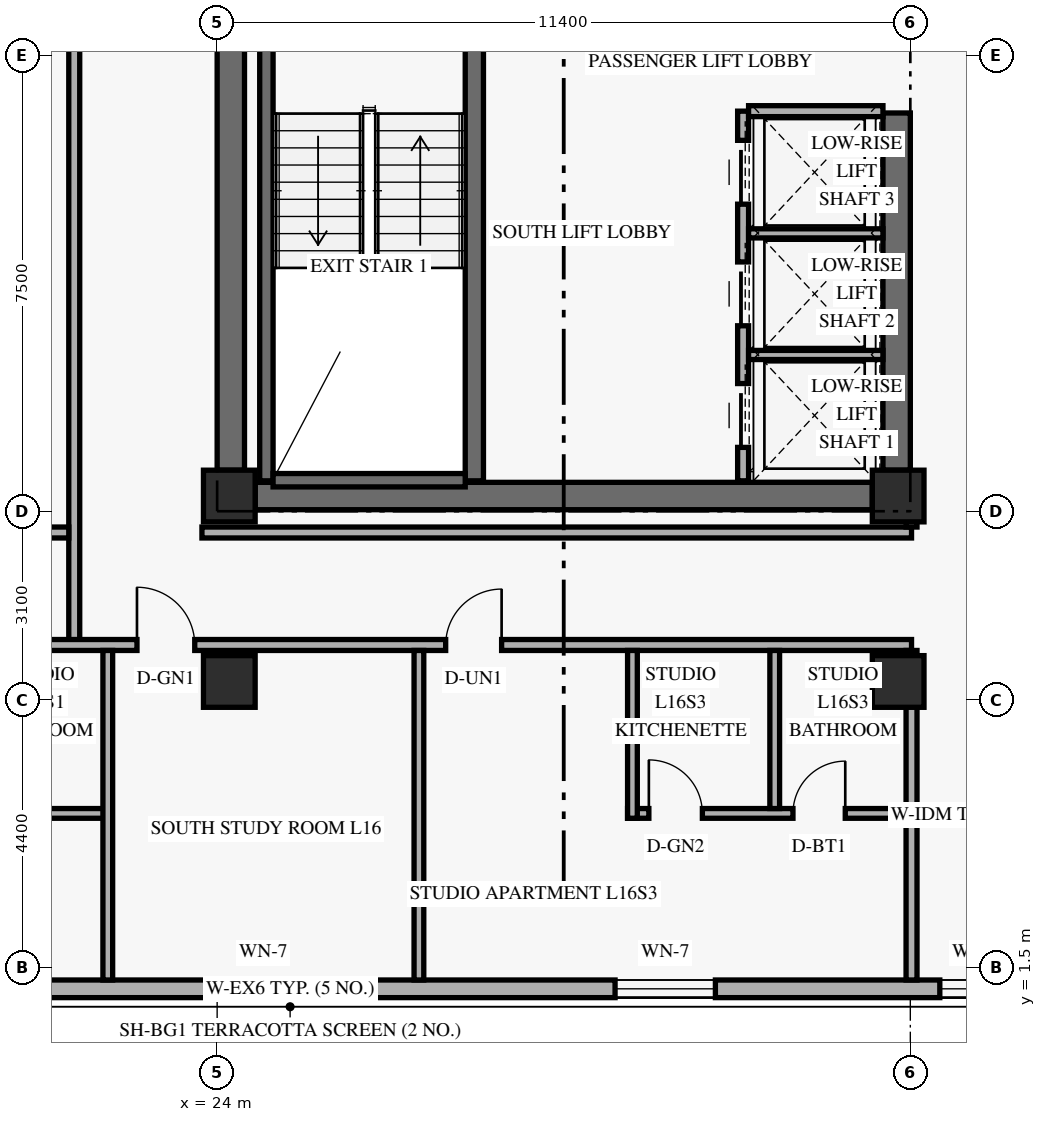
"""IFC4 building model, lengths in metres.
Left out: names, types, materials, properties, quantities, classifications, styles, units other than length and angle.
Written with IfcOpenShell. Run it as: python <this file> out.ifc"""

import sys

from ifc_helpers import new_model, si_unit, direction, frame, frame_2d, origin, origin_2d, place, context, subcontext, project, spatial, rectangle, extrude, element, fill, save


model = new_model("IFC4")
c1 = context("Model", 3, precision=1e-05, world=origin(), true_north=direction((0.0, 1.0)))
c2 = subcontext(c1, "Body", "Model", "MODEL_VIEW")
j1 = project(units=[si_unit("LENGTHUNIT", "METRE"), si_unit("PLANEANGLEUNIT", "RADIAN")], contexts=[c1])
p1 = place(None, origin())
s1 = spatial("IfcSite", under=j1, at=p1, CompositionType="ELEMENT")
p2 = place(p1, origin())
s2 = spatial("IfcBuilding", under=s1, at=p2, CompositionType="ELEMENT")
p3 = place(p2, frame((0.0, 0.0, 64.2)))
s3 = spatial("IfcBuildingStorey", under=s2, at=p3, CompositionType="ELEMENT", Elevation=64.2)
p4 = place(p3, frame((24.225, 9.675, 0.0), z_axis=(0.0, 0.0, 1.0), x_axis=(0.0, 1.0, 0.0)))
e1 = element("IfcWall", 1, at=p4, inside=s3, PredefinedType="SHEAR", context=c2, shape_type="SweptSolid", body=[
    extrude(rectangle(XDim=7.45, YDim=0.45, at=frame_2d((3.725, 0.0))), origin(), (0.0, 0.0, 1.0), 2.667),
])
p5 = place(p3, frame((35.175, 9.675, 0.0), z_axis=(0.0, 0.0, 1.0), x_axis=(0.0, 1.0, 0.0)))
e2 = element("IfcWall", 2, at=p5, inside=s3, PredefinedType="SHEAR", context=c2, shape_type="SweptSolid", body=[
    extrude(rectangle(XDim=5.875, YDim=0.45, at=frame_2d((2.938, 0.0))), origin(), (0.0, 0.0, 1.0), 2.667),
])
p6 = place(p3, frame((24.625, 9.25, 0.0), z_axis=(0.0, 0.0, 1.0), x_axis=(1.0, 0.0, 0.0)))
e3 = element("IfcWall", 3, at=p6, inside=s3, PredefinedType="SHEAR", context=c2, shape_type="SweptSolid", body=[
    extrude(rectangle(XDim=10.15, YDim=0.45, at=frame_2d((5.075, 0.0))), origin(), (0.0, 0.0, 1.0), 3.36),
])
p7 = place(p3, frame((24.81, 9.5, 0.0), z_axis=(0.0, 0.0, 1.0), x_axis=(0.0, 1.0, 0.0)))
e4 = element("IfcWall", 4, at=p7, inside=s3, PredefinedType="SHEAR", context=c2, shape_type="SweptSolid", body=[
    extrude(rectangle(XDim=7.76, YDim=0.22, at=frame_2d((3.88, 0.0))), origin(), (0.0, 0.0, 1.0), 3.36),
])
p8 = place(p3, frame((28.23, 9.5, 0.0), z_axis=(0.0, 0.0, 1.0), x_axis=(0.0, 1.0, 0.0)))
e5 = element("IfcWall", 5, at=p8, inside=s3, PredefinedType="SHEAR", context=c2, shape_type="SweptSolid", body=[
    extrude(rectangle(XDim=7.76, YDim=0.3, at=frame_2d((3.88, 0.0))), origin(), (0.0, 0.0, 1.0), 3.36),
])
p9 = place(p3, frame((24.92, 9.51, 0.0), z_axis=(0.0, 0.0, 1.0), x_axis=(1.0, 0.0, 0.0)))
e6 = element("IfcWall", 6, at=p9, inside=s3, PredefinedType="SHEAR", context=c2, shape_type="SweptSolid", body=[
    extrude(rectangle(XDim=3.16, YDim=0.22, at=frame_2d((1.58, 0.0))), origin(), (0.0, 0.0, 1.0), 3.36),
])
for number, where, z_axis, x_axis in (
    (7, (24.2, 6.2, 0.0), (0.0, 0.0, 1.0), (1.0, 0.0, 0.0)),
    (8, (24.2, 9.25, 0.0), (0.0, 0.0, 1.0), (1.0, 0.0, 0.0)),
    (9, (35.2, 6.2, 0.0), (0.0, 0.0, 1.0), (1.0, 0.0, 0.0)),
    (10, (35.2, 9.25, 0.0), (0.0, 0.0, 1.0), (1.0, 0.0, 0.0)),
):
    element("IfcColumn", number, at=place(p3, frame(where, z_axis=z_axis, x_axis=x_axis)), inside=s3, PredefinedType="COLUMN", context=c2, shape_type="SweptSolid", body=[
        extrude(rectangle(XDim=0.85, YDim=0.85, at=origin_2d()), origin(), (0.0, 0.0, 1.0), 3.6),
    ])
p10 = place(p3, frame((5.42, 1.145, 0.0), z_axis=(0.0, 0.0, 1.0), x_axis=(1.0, 0.0, 0.0)))
e11 = element("IfcWall", 11, at=p10, inside=s3, PredefinedType="SOLIDWALL", context=c2, shape_type="SweptSolid", body=[
    extrude(rectangle(XDim=39.56, YDim=0.29, at=frame_2d((19.78, 0.0))), origin(), (0.0, 0.0, 1.0), 3.36),
])
p11 = place(p10, frame((2.615, 0.0, 0.85)))
e12 = element("IfcOpeningElement", 12, at=p11, cuts=e11, PredefinedType="OPENING", context=c2, shape_type="SweptSolid", body=[
    extrude(rectangle(XDim=1.65, YDim=1.6, at=frame_2d((0.825, 0.8))), frame((0.0, 0.155, 0.0), z_axis=(0.0, -1.0, 0.0), x_axis=(1.0, 0.0, 0.0)), (0.0, 0.0, 1.0), 0.31),
])
p12 = place(p10, frame((7.18, 0.0, 0.85)))
e13 = element("IfcOpeningElement", 13, at=p12, cuts=e11, PredefinedType="OPENING", context=c2, shape_type="SweptSolid", body=[
    extrude(rectangle(XDim=1.2, YDim=1.5, at=frame_2d((0.6, 0.75))), frame((0.0, 0.155, 0.0), z_axis=(0.0, -1.0, 0.0), x_axis=(1.0, 0.0, 0.0)), (0.0, 0.0, 1.0), 0.31),
])
p13 = place(p10, frame((11.906, 0.0, 0.85)))
e14 = element("IfcOpeningElement", 14, at=p13, cuts=e11, PredefinedType="OPENING", context=c2, shape_type="SweptSolid", body=[
    extrude(rectangle(XDim=1.65, YDim=1.6, at=frame_2d((0.825, 0.8))), frame((0.0, 0.155, 0.0), z_axis=(0.0, -1.0, 0.0), x_axis=(1.0, 0.0, 0.0)), (0.0, 0.0, 1.0), 0.31),
])
p14 = place(p10, frame((18.515, 0.0, 0.85)))
e15 = element("IfcOpeningElement", 15, at=p14, cuts=e11, PredefinedType="OPENING", context=c2, shape_type="SweptSolid", body=[
    extrude(rectangle(XDim=1.65, YDim=1.6, at=frame_2d((0.825, 0.8))), frame((0.0, 0.155, 0.0), z_axis=(0.0, -1.0, 0.0), x_axis=(1.0, 0.0, 0.0)), (0.0, 0.0, 1.0), 0.31),
])
p15 = place(p10, frame((25.124, 0.0, 0.85)))
e16 = element("IfcOpeningElement", 16, at=p15, cuts=e11, PredefinedType="OPENING", context=c2, shape_type="SweptSolid", body=[
    extrude(rectangle(XDim=1.65, YDim=1.6, at=frame_2d((0.825, 0.8))), frame((0.0, 0.155, 0.0), z_axis=(0.0, -1.0, 0.0), x_axis=(1.0, 0.0, 0.0)), (0.0, 0.0, 1.0), 0.31),
])
p16 = place(p10, frame((30.465, 0.0, 0.85)))
e17 = element("IfcOpeningElement", 17, at=p16, cuts=e11, PredefinedType="OPENING", context=c2, shape_type="SweptSolid", body=[
    extrude(rectangle(XDim=1.2, YDim=1.5, at=frame_2d((0.6, 0.75))), frame((0.0, 0.155, 0.0), z_axis=(0.0, -1.0, 0.0), x_axis=(1.0, 0.0, 0.0)), (0.0, 0.0, 1.0), 0.31),
])
p17 = place(p10, frame((35.02, 0.0, 0.85)))
e18 = element("IfcOpeningElement", 18, at=p17, cuts=e11, PredefinedType="OPENING", context=c2, shape_type="SweptSolid", body=[
    extrude(rectangle(XDim=1.65, YDim=1.6, at=frame_2d((0.825, 0.8))), frame((0.0, 0.155, 0.0), z_axis=(0.0, -1.0, 0.0), x_axis=(1.0, 0.0, 0.0)), (0.0, 0.0, 1.0), 0.31),
])
p18 = place(p3, frame((32.65, 9.5, 0.0), z_axis=(0.0, 0.0, 1.0), x_axis=(0.0, 1.0, 0.0)))
e19 = element("IfcWall", 19, at=p18, inside=s3, PredefinedType="STANDARD", context=c2, shape_type="SweptSolid", body=[
    extrude(rectangle(XDim=6.08, YDim=0.18, at=frame_2d((3.04, 0.0))), origin(), (0.0, 0.0, 1.0), 3.36),
])
p19 = place(p18, frame((0.55, 0.0, 0.0)))
e20 = element("IfcOpeningElement", 20, at=p19, cuts=e19, PredefinedType="OPENING", context=c2, shape_type="SweptSolid", body=[
    extrude(rectangle(XDim=1.05, YDim=2.2, at=frame_2d((0.525, 1.1))), frame((0.0, 0.1, 0.0), z_axis=(0.0, -1.0, 0.0), x_axis=(1.0, 0.0, 0.0)), (0.0, 0.0, 1.0), 0.2),
])
p20 = place(p18, frame((2.55, 0.0, 0.0)))
e21 = element("IfcOpeningElement", 21, at=p20, cuts=e19, PredefinedType="OPENING", context=c2, shape_type="SweptSolid", body=[
    extrude(rectangle(XDim=1.05, YDim=2.2, at=frame_2d((0.525, 1.1))), frame((0.0, 0.1, 0.0), z_axis=(0.0, -1.0, 0.0), x_axis=(1.0, 0.0, 0.0)), (0.0, 0.0, 1.0), 0.2),
])
p21 = place(p18, frame((4.55, 0.0, 0.0)))
e22 = element("IfcOpeningElement", 22, at=p21, cuts=e19, PredefinedType="OPENING", context=c2, shape_type="SweptSolid", body=[
    extrude(rectangle(XDim=1.05, YDim=2.2, at=frame_2d((0.525, 1.1))), frame((0.0, 0.1, 0.0), z_axis=(0.0, -1.0, 0.0), x_axis=(1.0, 0.0, 0.0)), (0.0, 0.0, 1.0), 0.2),
])
p22 = place(p3, frame((32.74, 15.58, 0.0), z_axis=(0.0, 0.0, 1.0), x_axis=(1.0, 0.0, 0.0)))
e23 = element("IfcWall", 23, at=p22, inside=s3, PredefinedType="STANDARD", context=c2, shape_type="SweptSolid", body=[
    extrude(rectangle(XDim=2.21, YDim=0.18, at=frame_2d((1.105, 0.0))), origin(), (0.0, 0.0, 1.0), 3.36),
])
for number, where, z_axis, x_axis in (
    (24, (32.74, 11.57, 0.0), (0.0, 0.0, 1.0), (1.0, 0.0, 0.0)),
    (25, (32.74, 13.57, 0.0), (0.0, 0.0, 1.0), (1.0, 0.0, 0.0)),
):
    element("IfcWall", number, at=place(p3, frame(where, z_axis=z_axis, x_axis=x_axis)), inside=s3, PredefinedType="STANDARD", context=c2, shape_type="SweptSolid", body=[
        extrude(rectangle(XDim=2.21, YDim=0.15, at=frame_2d((1.105, 0.0))), origin(), (0.0, 0.0, 1.0), 3.36),
    ])
p23 = place(p3, frame((21.65, 6.8, 0.0), z_axis=(0.0, 0.0, 1.0), x_axis=(0.0, 1.0, 0.0)))
e26 = element("IfcWall", 26, at=p23, inside=s3, PredefinedType="STANDARD", context=c2, shape_type="SweptSolid", body=[
    extrude(rectangle(XDim=34.4, YDim=0.18, at=frame_2d((17.2, 0.0))), origin(), (0.0, 0.0, 1.0), 2.649),
])
p24 = place(p3, frame((14.1, 6.8, 0.0), z_axis=(0.0, 0.0, 1.0), x_axis=(1.0, 0.0, 0.0)))
e27 = element("IfcWall", 27, at=p24, inside=s3, PredefinedType="STANDARD", context=c2, shape_type="SweptSolid", body=[
    extrude(rectangle(XDim=21.32, YDim=0.18, at=frame_2d((10.66, 0.0))), origin(), (0.0, 0.0, 1.0), 2.649),
])
p25 = place(p24, frame((0.44, 0.0, 0.0)))
e28 = element("IfcOpeningElement", 28, at=p25, cuts=e27, PredefinedType="OPENING", context=c2, shape_type="SweptSolid", body=[
    extrude(rectangle(XDim=0.92, YDim=2.15, at=frame_2d((0.46, 1.075))), frame((0.0, 0.1, 0.0), z_axis=(0.0, -1.0, 0.0), x_axis=(1.0, 0.0, 0.0)), (0.0, 0.0, 1.0), 0.2),
])
p26 = place(p24, frame((8.582, 0.0, 0.0)))
e29 = element("IfcOpeningElement", 29, at=p26, cuts=e27, PredefinedType="OPENING", context=c2, shape_type="SweptSolid", body=[
    extrude(rectangle(XDim=0.95, YDim=2.15, at=frame_2d((0.475, 1.075))), frame((0.0, 0.1, 0.0), z_axis=(0.0, -1.0, 0.0), x_axis=(1.0, 0.0, 0.0)), (0.0, 0.0, 1.0), 0.2),
])
p27 = place(p24, frame((13.658, 0.0, 0.0)))
e30 = element("IfcOpeningElement", 30, at=p27, cuts=e27, PredefinedType="OPENING", context=c2, shape_type="SweptSolid", body=[
    extrude(rectangle(XDim=0.92, YDim=2.15, at=frame_2d((0.46, 1.075))), frame((0.0, 0.1, 0.0), z_axis=(0.0, -1.0, 0.0), x_axis=(1.0, 0.0, 0.0)), (0.0, 0.0, 1.0), 0.2),
])
p28 = place(p3, frame((23.75, 8.65, 0.0), z_axis=(0.0, 0.0, 1.0), x_axis=(1.0, 0.0, 0.0)))
e31 = element("IfcWall", 31, at=p28, inside=s3, PredefinedType="STANDARD", context=c2, shape_type="SweptSolid", body=[
    extrude(rectangle(XDim=11.67, YDim=0.18, at=frame_2d((5.835, 0.0))), origin(), (0.0, 0.0, 1.0), 2.649),
])
p29 = place(p3, frame((35.42, 1.29, 0.0), z_axis=(0.0, 0.0, 1.0), x_axis=(0.0, 1.0, 0.0)))
e32 = element("IfcWall", 32, at=p29, inside=s3, PredefinedType="PARTITIONING", context=c2, shape_type="SweptSolid", body=[
    extrude(rectangle(XDim=5.42, YDim=0.18, at=frame_2d((2.71, 0.0))), origin(), (0.0, 0.0, 1.0), 3.36),
])
p30 = place(p3, frame((35.42, 8.74, 0.0), z_axis=(0.0, 0.0, 1.0), x_axis=(0.0, 1.0, 0.0)))
e33 = element("IfcWall", 33, at=p30, inside=s3, PredefinedType="STANDARD", context=c2, shape_type="SweptSolid", body=[
    extrude(rectangle(XDim=0.51, YDim=0.18, at=frame_2d((0.255, 0.0))), origin(), (0.0, 0.0, 1.0), 3.36),
])
p31 = place(p3, frame((14.19, 8.65, 0.0), z_axis=(0.0, 0.0, 1.0), x_axis=(1.0, 0.0, 0.0)))
e34 = element("IfcWall", 34, at=p31, inside=s3, PredefinedType="STANDARD", context=c2, shape_type="SweptSolid", body=[
    extrude(rectangle(XDim=7.37, YDim=0.18, at=frame_2d((3.685, 0.0))), origin(), (0.0, 0.0, 1.0), 2.649),
])
p32 = place(p3, frame((17.531, 4.03, 0.0), z_axis=(0.0, 0.0, 1.0), x_axis=(1.0, 0.0, 0.0)))
e35 = element("IfcWall", 35, at=p32, inside=s3, PredefinedType="PLUMBINGWALL", context=c2, shape_type="SweptSolid", body=[
    extrude(rectangle(XDim=4.67, YDim=0.16, at=frame_2d((2.335, 0.0))), origin(), (0.0, 0.0, 1.0), 3.36),
])
p33 = place(p32, frame((0.35, 0.0, 0.0)))
e36 = element("IfcOpeningElement", 36, at=p33, cuts=e35, PredefinedType="OPENING", context=c2, shape_type="SweptSolid", body=[
    extrude(rectangle(XDim=0.88, YDim=2.12, at=frame_2d((0.44, 1.06))), frame((0.0, 0.09, 0.0), z_axis=(0.0, -1.0, 0.0), x_axis=(1.0, 0.0, 0.0)), (0.0, 0.0, 1.0), 0.18),
])
p34 = place(p32, frame((2.72, 0.0, 0.0)))
e37 = element("IfcOpeningElement", 37, at=p34, cuts=e35, PredefinedType="OPENING", context=c2, shape_type="SweptSolid", body=[
    extrude(rectangle(XDim=0.86, YDim=2.12, at=frame_2d((0.43, 1.06))), frame((0.0, 0.09, 0.0), z_axis=(0.0, -1.0, 0.0), x_axis=(1.0, 0.0, 0.0)), (0.0, 0.0, 1.0), 0.18),
])
for number, where, z_axis, x_axis in (
    (38, (22.202, 1.29, 0.0), (0.0, 0.0, 1.0), (0.0, 1.0, 0.0)),
    (39, (27.318, 1.29, 0.0), (0.0, 0.0, 1.0), (0.0, 1.0, 0.0)),
):
    element("IfcWall", number, at=place(p3, frame(where, z_axis=z_axis, x_axis=x_axis)), inside=s3, PredefinedType="PARTITIONING", context=c2, shape_type="SweptSolid", body=[
        extrude(rectangle(XDim=5.42, YDim=0.16, at=frame_2d((2.71, 0.0))), origin(), (0.0, 0.0, 1.0), 2.809),
    ])
p35 = place(p3, frame((30.75, 4.03, 0.0), z_axis=(0.0, 0.0, 1.0), x_axis=(1.0, 0.0, 0.0)))
e40 = element("IfcWall", 40, at=p35, inside=s3, PredefinedType="PLUMBINGWALL", context=c2, shape_type="SweptSolid", body=[
    extrude(rectangle(XDim=4.58, YDim=0.16, at=frame_2d((2.29, 0.0))), origin(), (0.0, 0.0, 1.0), 3.36),
])
p36 = place(p35, frame((0.35, 0.0, 0.0)))
e41 = element("IfcOpeningElement", 41, at=p36, cuts=e40, PredefinedType="OPENING", context=c2, shape_type="SweptSolid", body=[
    extrude(rectangle(XDim=0.88, YDim=2.12, at=frame_2d((0.44, 1.06))), frame((0.0, 0.09, 0.0), z_axis=(0.0, -1.0, 0.0), x_axis=(1.0, 0.0, 0.0)), (0.0, 0.0, 1.0), 0.18),
])
p37 = place(p35, frame((2.72, 0.0, 0.0)))
e42 = element("IfcOpeningElement", 42, at=p37, cuts=e40, PredefinedType="OPENING", context=c2, shape_type="SweptSolid", body=[
    extrude(rectangle(XDim=0.86, YDim=2.12, at=frame_2d((0.43, 1.06))), frame((0.0, 0.09, 0.0), z_axis=(0.0, -1.0, 0.0), x_axis=(1.0, 0.0, 0.0)), (0.0, 0.0, 1.0), 0.18),
])
p38 = place(p3, frame((30.83, 3.95, 0.0), z_axis=(0.0, 0.0, 1.0), x_axis=(0.0, 1.0, 0.0)))
e43 = element("IfcWall", 43, at=p38, inside=s3, PredefinedType="PLUMBINGWALL", context=c2, shape_type="SweptSolid", body=[
    extrude(rectangle(XDim=2.76, YDim=0.16, at=frame_2d((1.38, 0.0))), origin(), (0.0, 0.0, 1.0), 2.809),
])
p39 = place(p3, frame((33.17, 4.11, 0.0), z_axis=(0.0, 0.0, 1.0), x_axis=(0.0, 1.0, 0.0)))
e44 = element("IfcWall", 44, at=p39, inside=s3, PredefinedType="PLUMBINGWALL", context=c2, shape_type="SweptSolid", body=[
    extrude(rectangle(XDim=2.6, YDim=0.16, at=frame_2d((1.3, 0.0))), origin(), (0.0, 0.0, 1.0), 2.809),
])
p40 = place(p14, origin())
e45 = element("IfcWindow", 45, at=p40, inside=s3, PartitioningType="SINGLE_PANEL", PredefinedType="WINDOW", context=c2, shape_type="SweptSolid", body=[
    extrude(rectangle(XDim=1.65, YDim=1.6, at=frame_2d((0.825, 0.8))), frame((0.0, 0.03, 0.0), z_axis=(0.0, -1.0, 0.0), x_axis=(1.0, 0.0, 0.0)), (0.0, 0.0, 1.0), 0.06),
])
fill(e15, e45)
p41 = place(p15, origin())
e46 = element("IfcWindow", 46, at=p41, inside=s3, PartitioningType="SINGLE_PANEL", PredefinedType="WINDOW", context=c2, shape_type="SweptSolid", body=[
    extrude(rectangle(XDim=1.65, YDim=1.6, at=frame_2d((0.825, 0.8))), frame((0.0, 0.03, 0.0), z_axis=(0.0, -1.0, 0.0), x_axis=(1.0, 0.0, 0.0)), (0.0, 0.0, 1.0), 0.06),
])
fill(e16, e46)
p42 = place(p16, origin())
e47 = element("IfcWindow", 47, at=p42, inside=s3, PartitioningType="SINGLE_PANEL", PredefinedType="WINDOW", context=c2, shape_type="SweptSolid", body=[
    extrude(rectangle(XDim=1.2, YDim=1.5, at=frame_2d((0.6, 0.75))), frame((0.0, 0.03, 0.0), z_axis=(0.0, -1.0, 0.0), x_axis=(1.0, 0.0, 0.0)), (0.0, 0.0, 1.0), 0.06),
])
fill(e17, e47)
p43 = place(p19, origin())
e48 = element("IfcDoor", 48, at=p43, inside=s3, OperationType="SLIDING_TO_LEFT", PredefinedType="DOOR", context=c2, shape_type="SweptSolid", body=[
    extrude(rectangle(XDim=1.05, YDim=2.2, at=frame_2d((0.525, 1.1))), frame((0.0, 0.025, 0.0), z_axis=(0.0, -1.0, 0.0), x_axis=(1.0, 0.0, 0.0)), (0.0, 0.0, 1.0), 0.05),
])
fill(e20, e48)
p44 = place(p20, origin())
e49 = element("IfcDoor", 49, at=p44, inside=s3, OperationType="SLIDING_TO_LEFT", PredefinedType="DOOR", context=c2, shape_type="SweptSolid", body=[
    extrude(rectangle(XDim=1.05, YDim=2.2, at=frame_2d((0.525, 1.1))), frame((0.0, 0.025, 0.0), z_axis=(0.0, -1.0, 0.0), x_axis=(1.0, 0.0, 0.0)), (0.0, 0.0, 1.0), 0.05),
])
fill(e21, e49)
p45 = place(p21, origin())
e50 = element("IfcDoor", 50, at=p45, inside=s3, OperationType="SLIDING_TO_LEFT", PredefinedType="DOOR", context=c2, shape_type="SweptSolid", body=[
    extrude(rectangle(XDim=1.05, YDim=2.2, at=frame_2d((0.525, 1.1))), frame((0.0, 0.025, 0.0), z_axis=(0.0, -1.0, 0.0), x_axis=(1.0, 0.0, 0.0)), (0.0, 0.0, 1.0), 0.05),
])
fill(e22, e50)
p46 = place(p26, origin())
e51 = element("IfcDoor", 51, at=p46, inside=s3, OperationType="SINGLE_SWING_LEFT", PredefinedType="DOOR", context=c2, shape_type="SweptSolid", body=[
    extrude(rectangle(XDim=0.95, YDim=2.15, at=frame_2d((0.475, 1.075))), frame((0.0, 0.025, 0.0), z_axis=(0.0, -1.0, 0.0), x_axis=(1.0, 0.0, 0.0)), (0.0, 0.0, 1.0), 0.05),
])
fill(e29, e51)
p47 = place(p27, origin())
e52 = element("IfcDoor", 52, at=p47, inside=s3, OperationType="SINGLE_SWING_RIGHT", PredefinedType="DOOR", context=c2, shape_type="SweptSolid", body=[
    extrude(rectangle(XDim=0.92, YDim=2.15, at=frame_2d((0.46, 1.075))), frame((0.0, 0.025, 0.0), z_axis=(0.0, -1.0, 0.0), x_axis=(1.0, 0.0, 0.0)), (0.0, 0.0, 1.0), 0.05),
])
fill(e30, e52)
p48 = place(p36, origin())
e53 = element("IfcDoor", 53, at=p48, inside=s3, OperationType="SINGLE_SWING_LEFT", PredefinedType="DOOR", context=c2, shape_type="SweptSolid", body=[
    extrude(rectangle(XDim=0.88, YDim=2.12, at=frame_2d((0.44, 1.06))), frame((0.0, 0.025, 0.0), z_axis=(0.0, -1.0, 0.0), x_axis=(1.0, 0.0, 0.0)), (0.0, 0.0, 1.0), 0.05),
])
fill(e41, e53)
p49 = place(p37, origin())
e54 = element("IfcDoor", 54, at=p49, inside=s3, OperationType="SINGLE_SWING_RIGHT", PredefinedType="DOOR", context=c2, shape_type="SweptSolid", body=[
    extrude(rectangle(XDim=0.86, YDim=2.12, at=frame_2d((0.43, 1.06))), frame((0.0, 0.025, 0.0), z_axis=(0.0, -1.0, 0.0), x_axis=(1.0, 0.0, 0.0)), (0.0, 0.0, 1.0), 0.05),
])
fill(e42, e54)
save(model, sys.argv[1])
